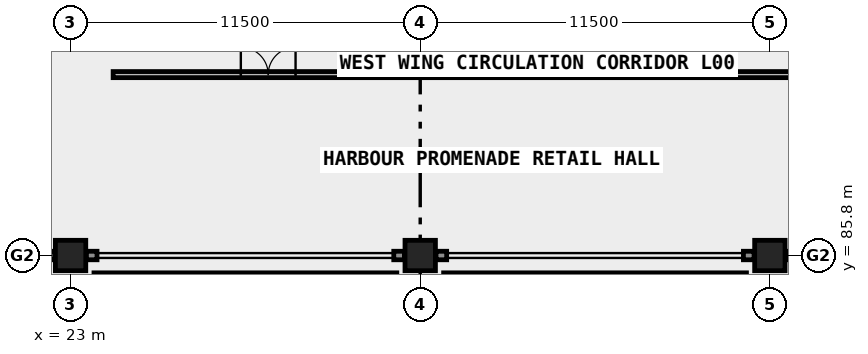
"""IFC4 building model, lengths in metres.
Left out: names, types, materials, properties, quantities, classifications, styles, units other than length and angle.
Written with IfcOpenShell. Run it as: python <this file> out.ifc"""

import sys

from ifc_helpers import new_model, si_unit, direction, frame, frame_2d, origin, origin_2d, place, context, subcontext, project, spatial, rectangle, extrude, element, fill, save


model = new_model("IFC4")
c1 = context("Model", 3, precision=1e-05, world=origin(), true_north=direction((0.0, 1.0)))
c2 = subcontext(c1, "Body", "Model", "MODEL_VIEW")
j1 = project(units=[si_unit("LENGTHUNIT", "METRE"), si_unit("PLANEANGLEUNIT", "RADIAN")], contexts=[c1])
p1 = place(None, origin())
s1 = spatial("IfcSite", under=j1, at=p1, CompositionType="ELEMENT")
p2 = place(p1, origin())
s2 = spatial("IfcBuilding", under=s1, at=p2, CompositionType="ELEMENT")
p3 = place(p2, origin())
s3 = spatial("IfcBuildingStorey", under=s2, at=p3, CompositionType="ELEMENT", Elevation=0.0)
for number, where, z_axis, x_axis in (
    (1, (23.0, 85.8, 0.0), (0.0, 0.0, 1.0), (1.0, 0.0, 0.0)),
    (2, (34.5, 85.8, 0.0), (0.0, 0.0, 1.0), (1.0, 0.0, 0.0)),
    (3, (46.0, 85.8, 0.0), (0.0, 0.0, 1.0), (1.0, 0.0, 0.0)),
):
    element("IfcColumn", number, at=place(p3, frame(where, z_axis=z_axis, x_axis=x_axis)), inside=s3, PredefinedType="COLUMN", context=c2, shape_type="SweptSolid", body=[
        extrude(rectangle(XDim=1.0, YDim=1.0, at=origin_2d()), origin(), (0.0, 0.0, 1.0), 4.2),
    ])
p4 = place(p3, frame((12.02, 85.8, 0.0), z_axis=(0.0, 0.0, 1.0), x_axis=(1.0, 0.0, 0.0)))
e4 = element("IfcWall", 4, at=p4, inside=s3, PredefinedType="SOLIDWALL", context=c2, shape_type="SweptSolid", body=[
    extrude(rectangle(XDim=10.46, YDim=0.28, at=frame_2d((5.23, 0.0))), origin(), (0.0, 0.0, 1.0), 3.15),
])
p5 = place(p4, frame((1.265, 0.0, 0.85)))
e5 = element("IfcOpeningElement", 5, at=p5, cuts=e4, PredefinedType="OPENING", context=c2, shape_type="SweptSolid", body=[
    extrude(rectangle(XDim=1.8, YDim=1.95, at=frame_2d((0.9, 0.975))), frame((0.0, 0.15, 0.0), z_axis=(0.0, -1.0, 0.0), x_axis=(1.0, 0.0, 0.0)), (0.0, 0.0, 1.0), 0.3),
])
p6 = place(p4, frame((4.33, 0.0, 0.85)))
e6 = element("IfcOpeningElement", 6, at=p6, cuts=e4, PredefinedType="OPENING", context=c2, shape_type="SweptSolid", body=[
    extrude(rectangle(XDim=1.8, YDim=1.95, at=frame_2d((0.9, 0.975))), frame((0.0, 0.15, 0.0), z_axis=(0.0, -1.0, 0.0), x_axis=(1.0, 0.0, 0.0)), (0.0, 0.0, 1.0), 0.3),
])
p7 = place(p4, frame((7.395, 0.0, 0.85)))
e7 = element("IfcOpeningElement", 7, at=p7, cuts=e4, PredefinedType="OPENING", context=c2, shape_type="SweptSolid", body=[
    extrude(rectangle(XDim=1.8, YDim=1.95, at=frame_2d((0.9, 0.975))), frame((0.0, 0.15, 0.0), z_axis=(0.0, -1.0, 0.0), x_axis=(1.0, 0.0, 0.0)), (0.0, 0.0, 1.0), 0.3),
])
for number, where, z_axis, x_axis in (
    (8, (23.52, 85.8, 0.0), (0.0, 0.0, 1.0), (1.0, 0.0, 0.0)),
    (9, (33.63, 85.8, 0.0), (0.0, 0.0, 1.0), (1.0, 0.0, 0.0)),
    (10, (35.02, 85.8, 0.0), (0.0, 0.0, 1.0), (1.0, 0.0, 0.0)),
    (11, (45.13, 85.8, 0.0), (0.0, 0.0, 1.0), (1.0, 0.0, 0.0)),
):
    element("IfcWall", number, at=place(p3, frame(where, z_axis=z_axis, x_axis=x_axis)), inside=s3, PredefinedType="SOLIDWALL", context=c2, shape_type="SweptSolid", body=[
        extrude(rectangle(XDim=0.35, YDim=0.28, at=frame_2d((0.175, 0.0))), origin(), (0.0, 0.0, 1.0), 3.93),
    ])
p8 = place(p3, frame((46.52, 85.8, 0.0), z_axis=(0.0, 0.0, 1.0), x_axis=(1.0, 0.0, 0.0)))
e12 = element("IfcWall", 12, at=p8, inside=s3, PredefinedType="SOLIDWALL", context=c2, shape_type="SweptSolid", body=[
    extrude(rectangle(XDim=10.46, YDim=0.28, at=frame_2d((5.23, 0.0))), origin(), (0.0, 0.0, 1.0), 3.15),
])
p9 = place(p8, frame((1.265, 0.0, 0.85)))
e13 = element("IfcOpeningElement", 13, at=p9, cuts=e12, PredefinedType="OPENING", context=c2, shape_type="SweptSolid", body=[
    extrude(rectangle(XDim=1.8, YDim=1.95, at=frame_2d((0.9, 0.975))), frame((0.0, 0.15, 0.0), z_axis=(0.0, -1.0, 0.0), x_axis=(1.0, 0.0, 0.0)), (0.0, 0.0, 1.0), 0.3),
])
p10 = place(p8, frame((4.33, 0.0, 0.85)))
e14 = element("IfcOpeningElement", 14, at=p10, cuts=e12, PredefinedType="OPENING", context=c2, shape_type="SweptSolid", body=[
    extrude(rectangle(XDim=1.8, YDim=1.95, at=frame_2d((0.9, 0.975))), frame((0.0, 0.15, 0.0), z_axis=(0.0, -1.0, 0.0), x_axis=(1.0, 0.0, 0.0)), (0.0, 0.0, 1.0), 0.3),
])
p11 = place(p8, frame((7.395, 0.0, 0.85)))
e15 = element("IfcOpeningElement", 15, at=p11, cuts=e12, PredefinedType="OPENING", context=c2, shape_type="SweptSolid", body=[
    extrude(rectangle(XDim=1.8, YDim=1.95, at=frame_2d((0.9, 0.975))), frame((0.0, 0.15, 0.0), z_axis=(0.0, -1.0, 0.0), x_axis=(1.0, 0.0, 0.0)), (0.0, 0.0, 1.0), 0.3),
])
p12 = place(p3, frame((24.4, 91.75, 0.0), z_axis=(0.0, 0.0, 1.0), x_axis=(1.0, 0.0, 0.0)))
e16 = element("IfcWall", 16, at=p12, inside=s3, PredefinedType="PARTITIONING", context=c2, shape_type="SweptSolid", body=[
    extrude(rectangle(XDim=29.4, YDim=0.2, at=frame_2d((14.7, 0.0))), origin(), (0.0, 0.0, 1.0), 3.88),
])
p13 = place(p12, frame((4.2, 0.0, 0.0)))
e17 = element("IfcOpeningElement", 17, at=p13, cuts=e16, PredefinedType="OPENING", context=c2, shape_type="SweptSolid", body=[
    extrude(rectangle(XDim=1.8, YDim=2.2, at=frame_2d((0.9, 1.1))), frame((0.0, 0.11, 0.0), z_axis=(0.0, -1.0, 0.0), x_axis=(1.0, 0.0, 0.0)), (0.0, 0.0, 1.0), 0.22),
])
p14 = place(p12, frame((16.5, 0.0, 0.0)))
e18 = element("IfcOpeningElement", 18, at=p14, cuts=e16, PredefinedType="OPENING", context=c2, shape_type="SweptSolid", body=[
    extrude(rectangle(XDim=0.98, YDim=2.15, at=frame_2d((0.49, 1.075))), frame((0.0, 0.11, 0.0), z_axis=(0.0, -1.0, 0.0), x_axis=(1.0, 0.0, 0.0)), (0.0, 0.0, 1.0), 0.22),
])
p15 = place(p13, origin())
e19 = element("IfcDoor", 19, at=p15, inside=s3, OperationType="DOUBLE_DOOR_SINGLE_SWING", PredefinedType="DOOR", context=c2, shape_type="SweptSolid", body=[
    extrude(rectangle(XDim=1.8, YDim=2.2, at=frame_2d((0.9, 1.1))), frame((0.0, 0.025, 0.0), z_axis=(0.0, -1.0, 0.0), x_axis=(1.0, 0.0, 0.0)), (0.0, 0.0, 1.0), 0.05),
])
fill(e17, e19)
p16 = place(p14, origin())
e20 = element("IfcDoor", 20, at=p16, inside=s3, OperationType="SINGLE_SWING_LEFT", PredefinedType="DOOR", context=c2, shape_type="SweptSolid", body=[
    extrude(rectangle(XDim=0.98, YDim=2.15, at=frame_2d((0.49, 1.075))), frame((0.0, 0.025, 0.0), z_axis=(0.0, -1.0, 0.0), x_axis=(1.0, 0.0, 0.0)), (0.0, 0.0, 1.0), 0.05),
])
fill(e18, e20)
save(model, sys.argv[1])
